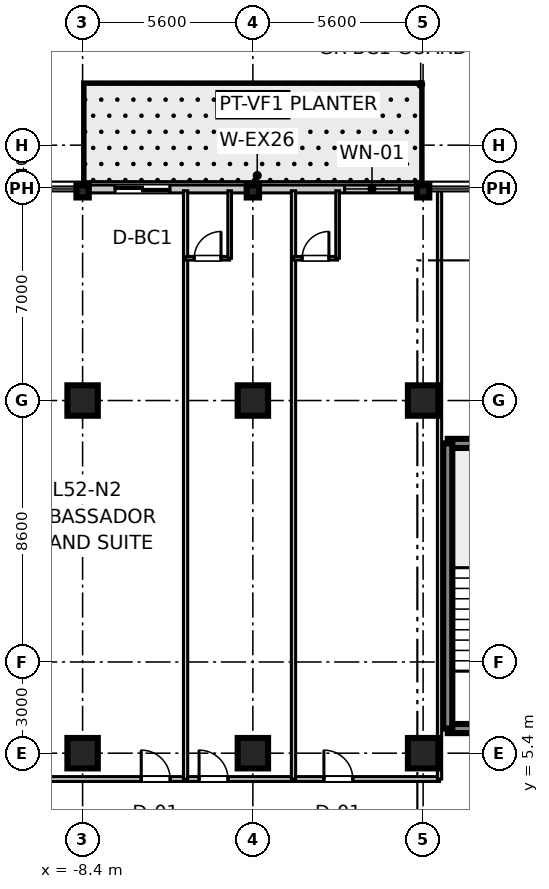
"""IFC4 building model, lengths in metres.
Left out: names, types, materials, properties, quantities, classifications, styles, units other than length and angle.
Written with IfcOpenShell. Run it as: python <this file> out.ifc"""

import sys

from ifc_helpers import new_model, si_unit, direction, frame, frame_2d, origin, origin_2d, place, context, subcontext, project, spatial, rectangle, i_section, extrude, source, transform, mapped, element, fill, save


model = new_model("IFC4")
c1 = context("Model", 3, precision=1e-05, world=origin(), true_north=direction((0.0, 1.0)))
c2 = subcontext(c1, "Body", "Model", "MODEL_VIEW")
j1 = project(units=[si_unit("LENGTHUNIT", "METRE"), si_unit("PLANEANGLEUNIT", "RADIAN")], contexts=[c1])
p1 = place(None, origin())
s1 = spatial("IfcSite", under=j1, at=p1, CompositionType="ELEMENT")
p2 = place(p1, origin())
s2 = spatial("IfcBuilding", under=s1, at=p2, CompositionType="ELEMENT")
p3 = place(p2, frame((0.0, 0.0, 204.9)))
s3 = spatial("IfcBuildingStorey", under=s2, at=p3, CompositionType="ELEMENT", Elevation=204.9)
m1 = source(origin(), c2, "Body", "SweptSolid", [
    extrude(rectangle(XDim=1.0, YDim=1.0, at=origin_2d()), origin(), (0.0, 0.0, 1.0), 3.655),
])
for number, where, z_axis, x_axis in (
    (1, (-8.4, 5.4, 0.0), (0.0, 0.0, 1.0), (1.0, 0.0, 0.0)),
    (2, (-8.4, 17.0, 0.0), (0.0, 0.0, 1.0), (1.0, 0.0, 0.0)),
    (3, (-2.8, 5.4, 0.0), (0.0, 0.0, 1.0), (1.0, 0.0, 0.0)),
    (4, (-2.8, 17.0, 0.0), (0.0, 0.0, 1.0), (1.0, 0.0, 0.0)),
    (5, (2.8, 5.4, 0.0), (0.0, 0.0, 1.0), (1.0, 0.0, 0.0)),
    (6, (2.8, 17.0, 0.0), (0.0, 0.0, 1.0), (1.0, 0.0, 0.0)),
):
    element("IfcColumn", number, at=place(p3, frame(where, z_axis=z_axis, x_axis=x_axis)), inside=s3, PredefinedType="COLUMN", context=c2, shape_type="MappedRepresentation", body=[
        mapped(m1, transform((0.0, 0.0, 0.0), scale=1.0)),
    ])
m2 = source(origin(), c2, "Body", "SweptSolid", [
    extrude(i_section(OverallWidth=0.401, OverallDepth=0.406, WebThickness=0.016, FlangeThickness=0.025, at=origin_2d()), origin(), (0.0, 0.0, 1.0), 3.655),
])
for number, where, z_axis, x_axis in (
    (7, (-8.4, 23.88, 0.0), (0.0, 0.0, 1.0), (0.0, 1.0, 0.0)),
    (8, (-2.8, 23.88, 0.0), (0.0, 0.0, 1.0), (0.0, 1.0, 0.0)),
    (9, (2.8, 23.88, 0.0), (0.0, 0.0, 1.0), (0.0, 1.0, 0.0)),
):
    element("IfcColumn", number, at=place(p3, frame(where, z_axis=z_axis, x_axis=x_axis)), inside=s3, PredefinedType="COLUMN", context=c2, shape_type="MappedRepresentation", body=[
        mapped(m2, transform((0.0, 0.0, 0.0), scale=1.0)),
    ])
m3 = source(origin(), c2, "Body", "SweptSolid", [
    extrude(rectangle(XDim=3.98, YDim=0.3, at=frame_2d((1.99, 0.0))), origin(), (0.0, 0.0, 1.0), 3.41),
])
for number, where, z_axis, x_axis in (
    (10, (3.61, 6.21, 0.0), (0.0, 0.0, 1.0), (1.0, 0.0, 0.0)),
    (11, (3.61, 15.59, 0.0), (0.0, 0.0, 1.0), (1.0, 0.0, 0.0)),
):
    element("IfcWall", number, at=place(p3, frame(where, z_axis=z_axis, x_axis=x_axis)), inside=s3, PredefinedType="SHEAR", context=c2, shape_type="MappedRepresentation", body=[
        mapped(m3, transform((0.0, 0.0, 0.0), scale=1.0)),
    ])
m4 = source(origin(), c2, "Body", "SweptSolid", [
    extrude(rectangle(XDim=9.38, YDim=0.3, at=frame_2d((4.69, 0.0))), origin(), (0.0, 0.0, 1.0), 3.41),
])
p4 = place(p3, frame((3.61, 6.21, 0.0), z_axis=(0.0, 0.0, 1.0), x_axis=(0.0, 1.0, 0.0)))
e12 = element("IfcWall", 12, at=p4, inside=s3, PredefinedType="SHEAR", context=c2, shape_type="MappedRepresentation", body=[
    mapped(m4, transform((0.0, 0.0, 0.0), scale=1.0)),
])
m5 = source(origin(), c2, "Body", "SweptSolid", [
    extrude(rectangle(XDim=11.2, YDim=0.26, at=frame_2d((5.6, 0.0))), origin(), (0.0, 0.0, 1.0), 2.89),
])
p5 = place(p3, frame((-8.4, 23.96, 0.0), z_axis=(0.0, 0.0, 1.0), x_axis=(1.0, 0.0, 0.0)))
e13 = element("IfcWall", 13, at=p5, inside=s3, PredefinedType="STANDARD", context=c2, shape_type="MappedRepresentation", body=[
    mapped(m5, transform((0.0, 0.0, 0.0), scale=1.0)),
])
p6 = place(p5, frame((1.069, 0.0, 0.0)))
e14 = element("IfcOpeningElement", 14, at=p6, cuts=e13, PredefinedType="OPENING", context=c2, shape_type="SweptSolid", body=[
    extrude(rectangle(XDim=1.8, YDim=2.25, at=frame_2d((0.9, 1.125))), frame((0.0, 0.14, 0.0), z_axis=(0.0, -1.0, 0.0), x_axis=(1.0, 0.0, 0.0)), (0.0, 0.0, 1.0), 0.28),
])
p7 = place(p5, frame((8.619, 0.0, 0.85)))
e15 = element("IfcOpeningElement", 15, at=p7, cuts=e13, PredefinedType="OPENING", context=c2, shape_type="SweptSolid", body=[
    extrude(rectangle(XDim=1.8, YDim=1.5, at=frame_2d((0.9, 0.75))), frame((0.0, 0.14, 0.0), z_axis=(0.0, -1.0, 0.0), x_axis=(1.0, 0.0, 0.0)), (0.0, 0.0, 1.0), 0.28),
])
m6 = source(origin(), c2, "Body", "SweptSolid", [
    extrude(rectangle(XDim=18.54, YDim=0.16, at=frame_2d((9.27, 0.0))), origin(), (0.0, 0.0, 1.0), 2.75),
])
p8 = place(p3, frame((-15.2, 4.55, 0.0), z_axis=(0.0, 0.0, 1.0), x_axis=(1.0, 0.0, 0.0)))
e16 = element("IfcWall", 16, at=p8, inside=s3, PredefinedType="PARTITIONING", context=c2, shape_type="MappedRepresentation", body=[
    mapped(m6, transform((0.0, 0.0, 0.0), scale=1.0)),
])
p9 = place(p8, frame((2.057, 0.0, 0.0)))
e17 = element("IfcOpeningElement", 17, at=p9, cuts=e16, PredefinedType="OPENING", context=c2, shape_type="SweptSolid", body=[
    extrude(rectangle(XDim=0.95, YDim=2.1, at=frame_2d((0.475, 1.05))), frame((0.0, 0.09, 0.0), z_axis=(0.0, -1.0, 0.0), x_axis=(1.0, 0.0, 0.0)), (0.0, 0.0, 1.0), 0.18),
])
p10 = place(p8, frame((8.729, 0.0, 0.0)))
e18 = element("IfcOpeningElement", 18, at=p10, cuts=e16, PredefinedType="OPENING", context=c2, shape_type="SweptSolid", body=[
    extrude(rectangle(XDim=0.95, YDim=2.1, at=frame_2d((0.475, 1.05))), frame((0.0, 0.09, 0.0), z_axis=(0.0, -1.0, 0.0), x_axis=(1.0, 0.0, 0.0)), (0.0, 0.0, 1.0), 0.18),
])
p11 = place(p8, frame((10.631, 0.0, 0.0)))
e19 = element("IfcOpeningElement", 19, at=p11, cuts=e16, PredefinedType="OPENING", context=c2, shape_type="SweptSolid", body=[
    extrude(rectangle(XDim=0.95, YDim=2.1, at=frame_2d((0.475, 1.05))), frame((0.0, 0.09, 0.0), z_axis=(0.0, -1.0, 0.0), x_axis=(1.0, 0.0, 0.0)), (0.0, 0.0, 1.0), 0.18),
])
p12 = place(p8, frame((14.737, 0.0, 0.0)))
e20 = element("IfcOpeningElement", 20, at=p12, cuts=e16, PredefinedType="OPENING", context=c2, shape_type="SweptSolid", body=[
    extrude(rectangle(XDim=0.95, YDim=2.1, at=frame_2d((0.475, 1.05))), frame((0.0, 0.09, 0.0), z_axis=(0.0, -1.0, 0.0), x_axis=(1.0, 0.0, 0.0)), (0.0, 0.0, 1.0), 0.18),
])
m7 = source(origin(), c2, "Body", "SweptSolid", [
    extrude(rectangle(XDim=19.35, YDim=0.14, at=frame_2d((9.675, 0.0))), origin(), (0.0, 0.0, 1.0), 2.75),
])
for number, where, z_axis, x_axis in (
    (21, (3.34, 4.55, 0.0), (0.0, 0.0, 1.0), (0.0, 1.0, 0.0)),
    (22, (-5.013, 4.55, 0.0), (0.0, 0.0, 1.0), (0.0, 1.0, 0.0)),
):
    element("IfcWall", number, at=place(p3, frame(where, z_axis=z_axis, x_axis=x_axis)), inside=s3, PredefinedType="PARTITIONING", context=c2, shape_type="MappedRepresentation", body=[
        mapped(m7, transform((0.0, 0.0, 0.0), scale=1.0)),
    ])
m8 = source(origin(), c2, "Body", "SweptSolid", [
    extrude(rectangle(XDim=1.45, YDim=0.12, at=frame_2d((0.725, 0.0))), origin(), (0.0, 0.0, 1.0), 2.75),
])
p13 = place(p3, frame((-5.013, 21.68, 0.0), z_axis=(0.0, 0.0, 1.0), x_axis=(1.0, 0.0, 0.0)))
e23 = element("IfcWall", 23, at=p13, inside=s3, PredefinedType="PARTITIONING", context=c2, shape_type="MappedRepresentation", body=[
    mapped(m8, transform((0.0, 0.0, 0.0), scale=1.0)),
])
p14 = place(p13, frame((0.285, 0.0, 0.0)))
e24 = element("IfcOpeningElement", 24, at=p14, cuts=e23, PredefinedType="OPENING", context=c2, shape_type="SweptSolid", body=[
    extrude(rectangle(XDim=0.88, YDim=2.1, at=frame_2d((0.44, 1.05))), frame((0.0, 0.07, 0.0), z_axis=(0.0, -1.0, 0.0), x_axis=(1.0, 0.0, 0.0)), (0.0, 0.0, 1.0), 0.14),
])
m9 = source(origin(), c2, "Body", "SweptSolid", [
    extrude(rectangle(XDim=2.22, YDim=0.12, at=frame_2d((1.11, 0.0))), origin(), (0.0, 0.0, 1.0), 2.75),
])
p15 = place(p3, frame((-3.563, 21.68, 0.0), z_axis=(0.0, 0.0, 1.0), x_axis=(0.0, 1.0, 0.0)))
e25 = element("IfcWall", 25, at=p15, inside=s3, PredefinedType="PARTITIONING", context=c2, shape_type="MappedRepresentation", body=[
    mapped(m9, transform((0.0, 0.0, 0.0), scale=1.0)),
])
p16 = place(p3, frame((-1.463, 4.55, 0.0), z_axis=(0.0, 0.0, 1.0), x_axis=(0.0, 1.0, 0.0)))
e26 = element("IfcWall", 26, at=p16, inside=s3, PredefinedType="PARTITIONING", context=c2, shape_type="MappedRepresentation", body=[
    mapped(m7, transform((0.0, 0.0, 0.0), scale=1.0)),
])
p17 = place(p3, frame((-1.463, 21.68, 0.0), z_axis=(0.0, 0.0, 1.0), x_axis=(1.0, 0.0, 0.0)))
e27 = element("IfcWall", 27, at=p17, inside=s3, PredefinedType="PARTITIONING", context=c2, shape_type="MappedRepresentation", body=[
    mapped(m8, transform((0.0, 0.0, 0.0), scale=1.0)),
])
p18 = place(p17, frame((0.285, 0.0, 0.0)))
e28 = element("IfcOpeningElement", 28, at=p18, cuts=e27, PredefinedType="OPENING", context=c2, shape_type="SweptSolid", body=[
    extrude(rectangle(XDim=0.88, YDim=2.1, at=frame_2d((0.44, 1.05))), frame((0.0, 0.07, 0.0), z_axis=(0.0, -1.0, 0.0), x_axis=(1.0, 0.0, 0.0)), (0.0, 0.0, 1.0), 0.14),
])
p19 = place(p3, frame((-0.013, 21.68, 0.0), z_axis=(0.0, 0.0, 1.0), x_axis=(0.0, 1.0, 0.0)))
e29 = element("IfcWall", 29, at=p19, inside=s3, PredefinedType="PARTITIONING", context=c2, shape_type="MappedRepresentation", body=[
    mapped(m9, transform((0.0, 0.0, 0.0), scale=1.0)),
])
m10 = source(origin(), c2, "Body", "SweptSolid", [
    extrude(rectangle(XDim=0.95, YDim=2.1, at=frame_2d((0.475, 1.05))), frame((0.0, 0.025, 0.0), z_axis=(0.0, -1.0, 0.0), x_axis=(1.0, 0.0, 0.0)), (0.0, 0.0, 1.0), 0.05),
])
p20 = place(p10, origin())
e30 = element("IfcDoor", 30, at=p20, inside=s3, OperationType="SINGLE_SWING_LEFT", PredefinedType="DOOR", context=c2, shape_type="MappedRepresentation", body=[
    mapped(m10, transform((0.0, 0.0, 0.0), scale=1.0)),
])
fill(e18, e30)
m11 = source(origin(), c2, "Body", "SweptSolid", [
    extrude(rectangle(XDim=0.88, YDim=2.1, at=frame_2d((0.44, 1.05))), frame((0.0, 0.025, 0.0), z_axis=(0.0, -1.0, 0.0), x_axis=(1.0, 0.0, 0.0)), (0.0, 0.0, 1.0), 0.05),
])
p21 = place(p14, origin())
e31 = element("IfcDoor", 31, at=p21, inside=s3, OperationType="SINGLE_SWING_RIGHT", PredefinedType="DOOR", context=c2, shape_type="MappedRepresentation", body=[
    mapped(m11, transform((0.0, 0.0, 0.0), scale=1.0)),
])
fill(e24, e31)
p22 = place(p11, origin())
e32 = element("IfcDoor", 32, at=p22, inside=s3, OperationType="SINGLE_SWING_LEFT", PredefinedType="DOOR", context=c2, shape_type="MappedRepresentation", body=[
    mapped(m10, transform((0.0, 0.0, 0.0), scale=1.0)),
])
fill(e19, e32)
p23 = place(p18, origin())
e33 = element("IfcDoor", 33, at=p23, inside=s3, OperationType="SINGLE_SWING_RIGHT", PredefinedType="DOOR", context=c2, shape_type="MappedRepresentation", body=[
    mapped(m11, transform((0.0, 0.0, 0.0), scale=1.0)),
])
fill(e28, e33)
p24 = place(p12, origin())
e34 = element("IfcDoor", 34, at=p24, inside=s3, OperationType="SINGLE_SWING_LEFT", PredefinedType="DOOR", context=c2, shape_type="MappedRepresentation", body=[
    mapped(m10, transform((0.0, 0.0, 0.0), scale=1.0)),
])
fill(e20, e34)
m12 = source(origin(), c2, "Body", "SweptSolid", [
    extrude(rectangle(XDim=1.8, YDim=2.25, at=frame_2d((0.9, 1.125))), frame((0.0, 0.025, 0.0), z_axis=(0.0, -1.0, 0.0), x_axis=(1.0, 0.0, 0.0)), (0.0, 0.0, 1.0), 0.05),
])
p25 = place(p6, origin())
e35 = element("IfcDoor", 35, at=p25, inside=s3, OperationType="DOUBLE_DOOR_SLIDING", PredefinedType="DOOR", context=c2, shape_type="MappedRepresentation", body=[
    mapped(m12, transform((0.0, 0.0, 0.0), scale=1.0)),
])
fill(e14, e35)
m13 = source(origin(), c2, "Body", "SweptSolid", [
    extrude(rectangle(XDim=1.8, YDim=1.5, at=frame_2d((0.9, 0.75))), frame((0.0, 0.03, 0.0), z_axis=(0.0, -1.0, 0.0), x_axis=(1.0, 0.0, 0.0)), (0.0, 0.0, 1.0), 0.06),
])
p26 = place(p7, origin())
e36 = element("IfcWindow", 36, at=p26, inside=s3, PartitioningType="SINGLE_PANEL", PredefinedType="WINDOW", context=c2, shape_type="MappedRepresentation", body=[
    mapped(m13, transform((0.0, 0.0, 0.0), scale=1.0)),
])
fill(e15, e36)
save(model, sys.argv[1])
